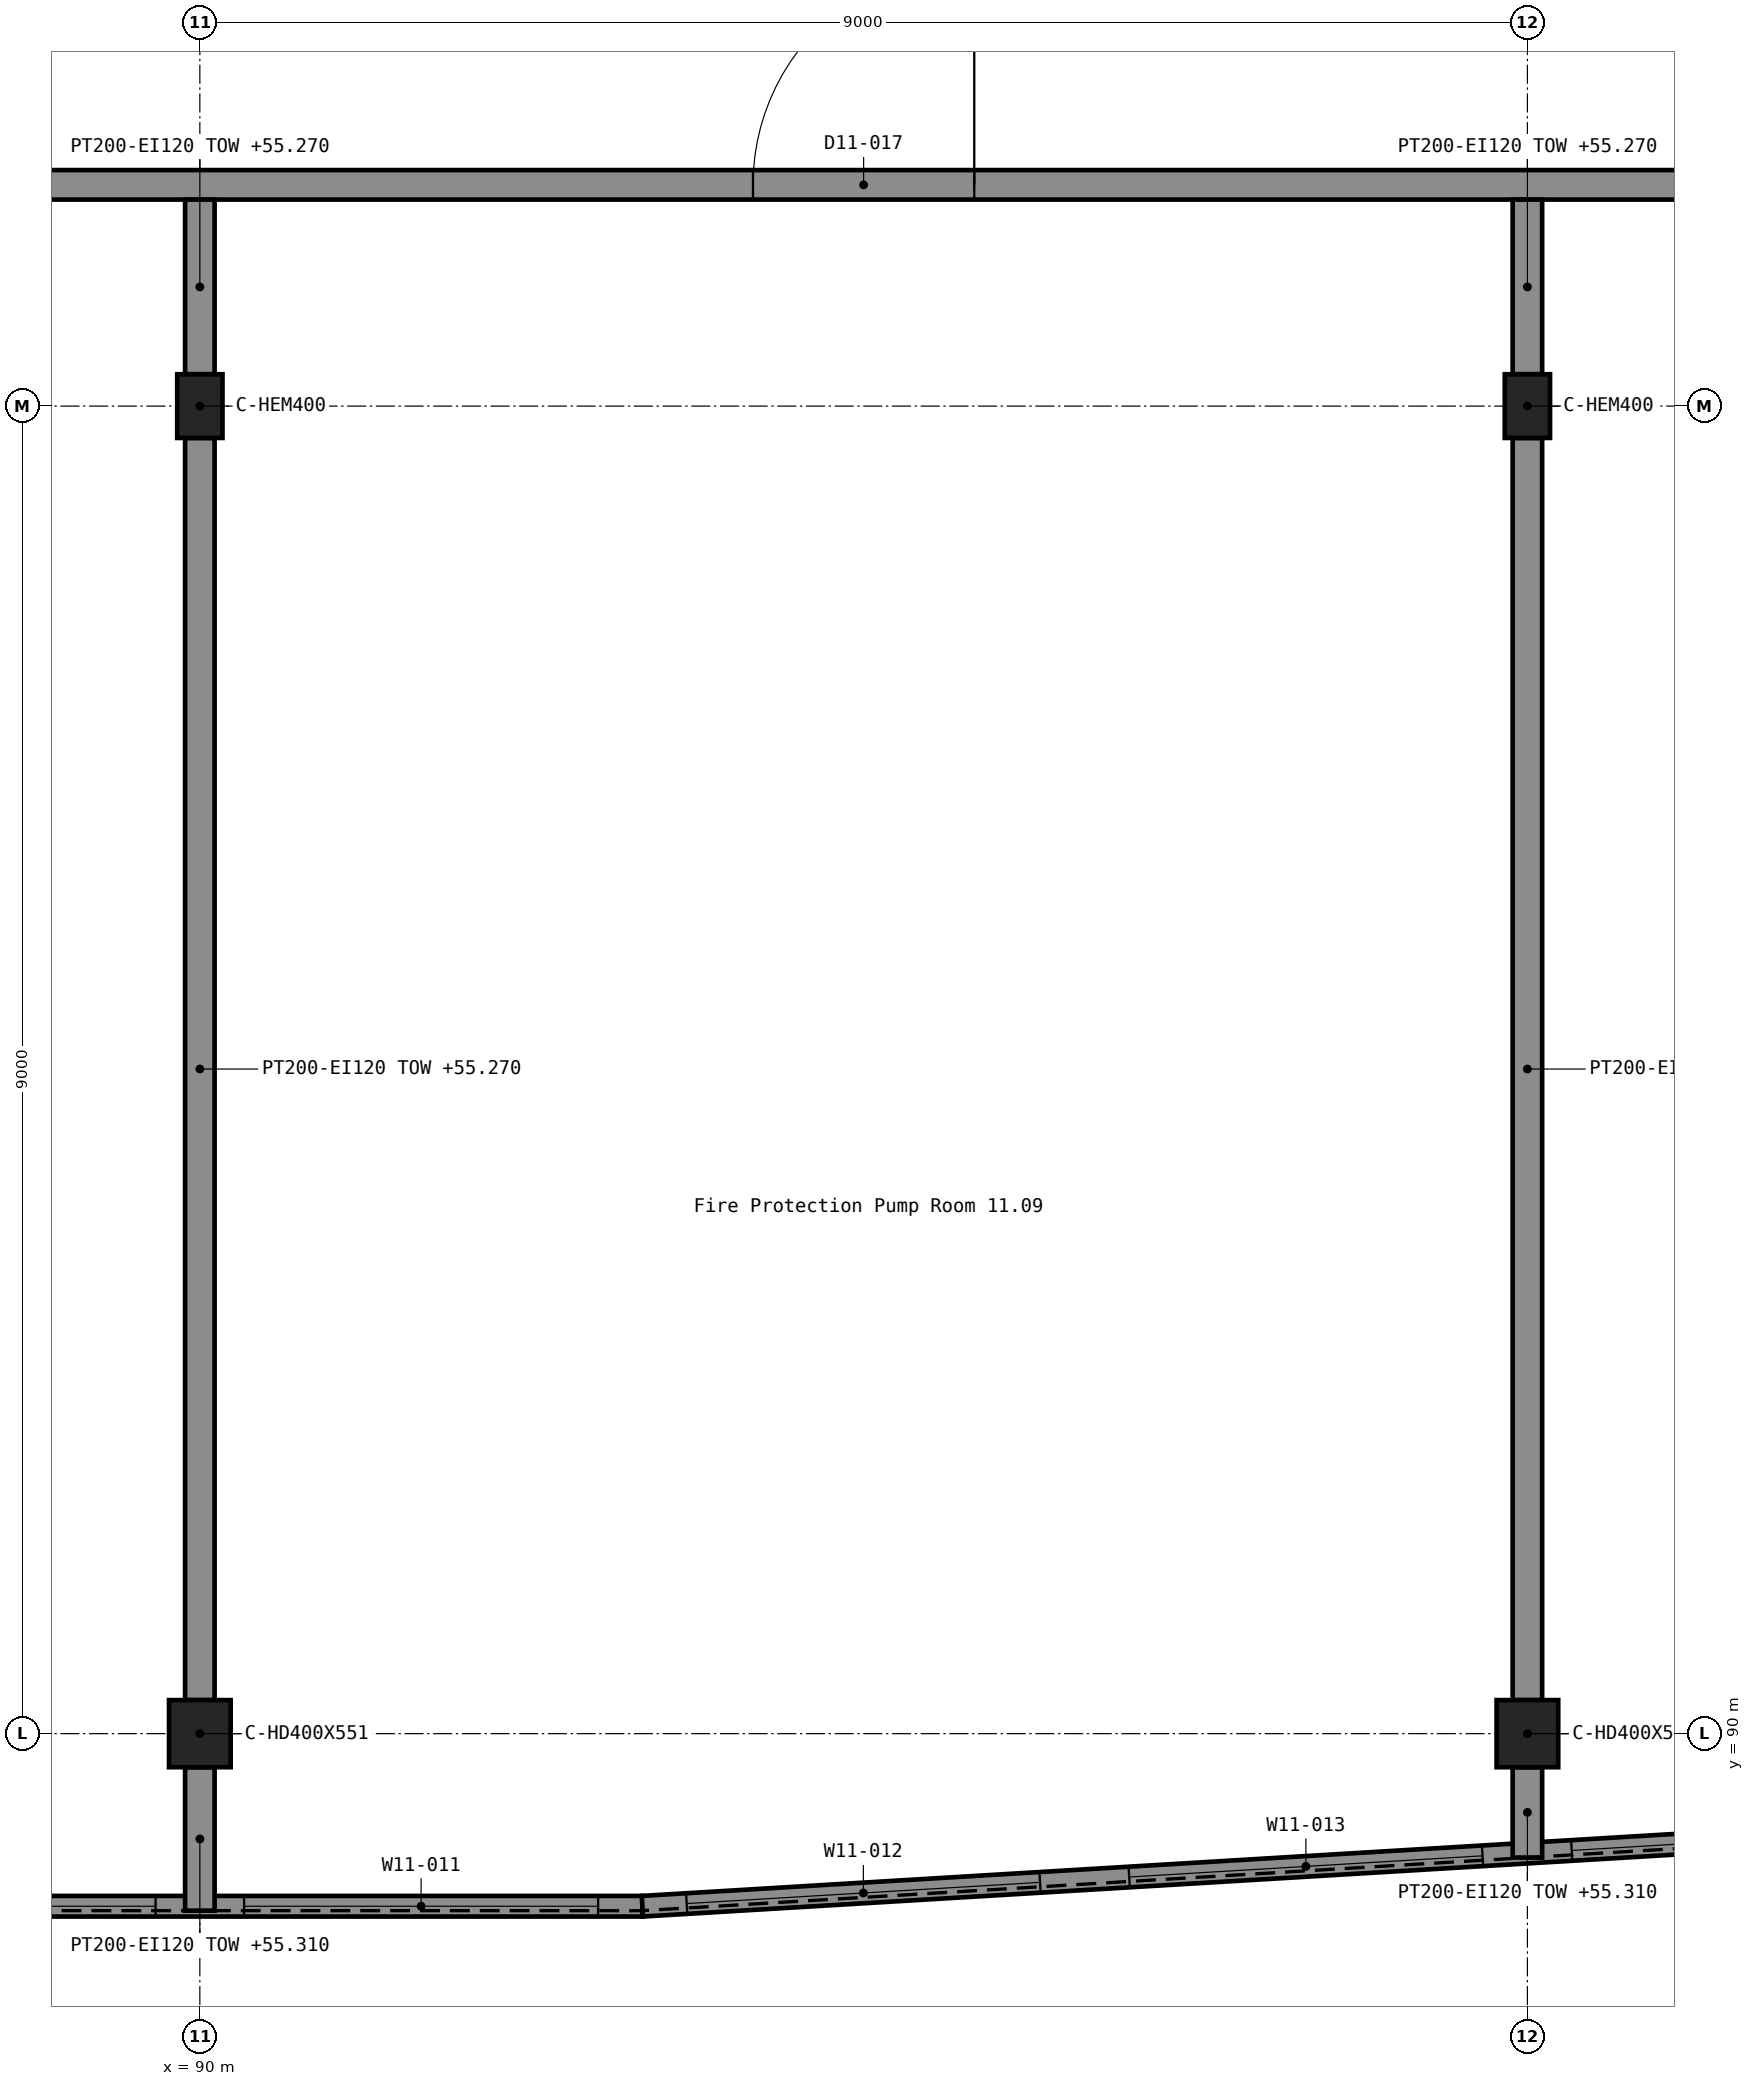
"""IFC4 building model, lengths in metres.
Left out: names, types, materials, properties, quantities, classifications, styles, units other than length and angle.
Written with IfcOpenShell. Run it as: python <this file> out.ifc"""

import sys

from ifc_helpers import new_model, si_unit, direction, frame, frame_2d, origin, origin_2d, place, context, subcontext, project, spatial, rectangle, i_section, extrude, element, fill, save


model = new_model("IFC4")
c1 = context("Model", 3, precision=1e-05, world=origin(), true_north=direction((0.0, 1.0)))
c2 = subcontext(c1, "Body", "Model", "MODEL_VIEW")
j1 = project(units=[si_unit("LENGTHUNIT", "METRE"), si_unit("PLANEANGLEUNIT", "RADIAN")], contexts=[c1])
p1 = place(None, origin())
s1 = spatial("IfcSite", under=j1, at=p1, CompositionType="ELEMENT")
p2 = place(p1, origin())
s2 = spatial("IfcBuilding", under=s1, at=p2, CompositionType="ELEMENT")
p3 = place(p2, frame((0.0, 0.0, 51.9)))
s3 = spatial("IfcBuildingStorey", under=s2, at=p3, CompositionType="ELEMENT", Elevation=51.9)
for number, where, z_axis, x_axis in (
    (1, (90.0, 90.0, 0.0), (0.0, 0.0, 1.0), (1.0, 0.0, 0.0)),
    (2, (99.0, 90.0, 0.0), (0.0, 0.0, 1.0), (1.0, 0.0, 0.0)),
):
    element("IfcColumn", number, at=place(p3, frame(where, z_axis=z_axis, x_axis=x_axis)), inside=s3, PredefinedType="COLUMN", context=c2, shape_type="SweptSolid", body=[
        extrude(i_section(OverallWidth=0.418, OverallDepth=0.455, WebThickness=0.042, FlangeThickness=0.068, FilletRadius=0.015, at=origin_2d()), origin(), (0.0, 0.0, 1.0), 3.9),
    ])
for number, where, z_axis, x_axis in (
    (3, (90.0, 99.0, 0.0), (0.0, 0.0, 1.0), (1.0, 0.0, 0.0)),
    (4, (99.0, 99.0, 0.0), (0.0, 0.0, 1.0), (1.0, 0.0, 0.0)),
):
    element("IfcColumn", number, at=place(p3, frame(where, z_axis=z_axis, x_axis=x_axis)), inside=s3, PredefinedType="COLUMN", context=c2, shape_type="SweptSolid", body=[
        extrude(i_section(OverallWidth=0.307, OverallDepth=0.432, WebThickness=0.021, FlangeThickness=0.04, FilletRadius=0.027, at=origin_2d()), origin(), (0.0, 0.0, 1.0), 3.9),
    ])
p4 = place(p3, frame((78.002, 88.83, 0.0), z_axis=(0.0, 0.0, 1.0), x_axis=(1.0, 0.0, 0.0)))
e5 = element("IfcWall", 5, at=p4, inside=s3, PredefinedType="SOLIDWALL", context=c2, shape_type="SweptSolid", body=[
    extrude(rectangle(XDim=14.998, YDim=0.14, at=frame_2d((7.499, 0.0))), origin(), (0.0, 0.0, 1.0), 3.9),
])
p5 = place(p4, frame((0.298, 0.0, 0.6)))
e6 = element("IfcOpeningElement", 6, at=p5, cuts=e5, PredefinedType="OPENING", context=c2, shape_type="SweptSolid", body=[
    extrude(rectangle(XDim=2.4, YDim=2.4, at=frame_2d((1.2, 1.2))), frame((0.0, 0.081, 0.0), z_axis=(0.0, -1.0, 0.0), x_axis=(1.0, 0.0, 0.0)), (0.0, 0.0, 1.0), 0.162),
])
p6 = place(p4, frame((3.298, 0.0, 0.6)))
e7 = element("IfcOpeningElement", 7, at=p6, cuts=e5, PredefinedType="OPENING", context=c2, shape_type="SweptSolid", body=[
    extrude(rectangle(XDim=2.4, YDim=2.4, at=frame_2d((1.2, 1.2))), frame((0.0, 0.081, 0.0), z_axis=(0.0, -1.0, 0.0), x_axis=(1.0, 0.0, 0.0)), (0.0, 0.0, 1.0), 0.162),
])
p7 = place(p4, frame((6.298, 0.0, 0.6)))
e8 = element("IfcOpeningElement", 8, at=p7, cuts=e5, PredefinedType="OPENING", context=c2, shape_type="SweptSolid", body=[
    extrude(rectangle(XDim=2.4, YDim=2.4, at=frame_2d((1.2, 1.2))), frame((0.0, 0.081, 0.0), z_axis=(0.0, -1.0, 0.0), x_axis=(1.0, 0.0, 0.0)), (0.0, 0.0, 1.0), 0.162),
])
p8 = place(p4, frame((9.298, 0.0, 0.6)))
e9 = element("IfcOpeningElement", 9, at=p8, cuts=e5, PredefinedType="OPENING", context=c2, shape_type="SweptSolid", body=[
    extrude(rectangle(XDim=2.4, YDim=2.4, at=frame_2d((1.2, 1.2))), frame((0.0, 0.081, 0.0), z_axis=(0.0, -1.0, 0.0), x_axis=(1.0, 0.0, 0.0)), (0.0, 0.0, 1.0), 0.162),
])
p9 = place(p4, frame((12.298, 0.0, 0.6)))
e10 = element("IfcOpeningElement", 10, at=p9, cuts=e5, PredefinedType="OPENING", context=c2, shape_type="SweptSolid", body=[
    extrude(rectangle(XDim=2.4, YDim=2.4, at=frame_2d((1.2, 1.2))), frame((0.0, 0.081, 0.0), z_axis=(0.0, -1.0, 0.0), x_axis=(1.0, 0.0, 0.0)), (0.0, 0.0, 1.0), 0.162),
])
p10 = place(p3, frame((93.0, 88.83, 0.0), z_axis=(0.0, 0.0, 1.0), x_axis=(0.998204826037, 0.059892614536, 0.0)))
e11 = element("IfcWall", 11, at=p10, inside=s3, PredefinedType="SOLIDWALL", context=c2, shape_type="SweptSolid", body=[
    extrude(rectangle(XDim=15.025, YDim=0.14, at=frame_2d((7.513, 0.0))), origin(), (0.0, 0.0, 1.0), 3.9),
])
p11 = place(p10, frame((0.301, 0.0, 0.6)))
e12 = element("IfcOpeningElement", 12, at=p11, cuts=e11, PredefinedType="OPENING", context=c2, shape_type="SweptSolid", body=[
    extrude(rectangle(XDim=2.4, YDim=2.4, at=frame_2d((1.2, 1.2))), frame((0.0, 0.081, 0.0), z_axis=(0.0, -1.0, 0.0), x_axis=(1.0, 0.0, 0.0)), (0.0, 0.0, 1.0), 0.162),
])
p12 = place(p10, frame((3.306, 0.0, 0.6)))
e13 = element("IfcOpeningElement", 13, at=p12, cuts=e11, PredefinedType="OPENING", context=c2, shape_type="SweptSolid", body=[
    extrude(rectangle(XDim=2.4, YDim=2.4, at=frame_2d((1.2, 1.2))), frame((0.0, 0.081, 0.0), z_axis=(0.0, -1.0, 0.0), x_axis=(1.0, 0.0, 0.0)), (0.0, 0.0, 1.0), 0.162),
])
p13 = place(p10, frame((6.312, 0.0, 0.6)))
e14 = element("IfcOpeningElement", 14, at=p13, cuts=e11, PredefinedType="OPENING", context=c2, shape_type="SweptSolid", body=[
    extrude(rectangle(XDim=2.4, YDim=2.4, at=frame_2d((1.2, 1.2))), frame((0.0, 0.081, 0.0), z_axis=(0.0, -1.0, 0.0), x_axis=(1.0, 0.0, 0.0)), (0.0, 0.0, 1.0), 0.162),
])
p14 = place(p10, frame((9.317, 0.0, 0.6)))
e15 = element("IfcOpeningElement", 15, at=p14, cuts=e11, PredefinedType="OPENING", context=c2, shape_type="SweptSolid", body=[
    extrude(rectangle(XDim=2.4, YDim=2.4, at=frame_2d((1.2, 1.2))), frame((0.0, 0.081, 0.0), z_axis=(0.0, -1.0, 0.0), x_axis=(1.0, 0.0, 0.0)), (0.0, 0.0, 1.0), 0.162),
])
p15 = place(p10, frame((12.323, 0.0, 0.6)))
e16 = element("IfcOpeningElement", 16, at=p15, cuts=e11, PredefinedType="OPENING", context=c2, shape_type="SweptSolid", body=[
    extrude(rectangle(XDim=2.4, YDim=2.4, at=frame_2d((1.2, 1.2))), frame((0.0, 0.081, 0.0), z_axis=(0.0, -1.0, 0.0), x_axis=(1.0, 0.0, 0.0)), (0.0, 0.0, 1.0), 0.162),
])
p16 = place(p3, frame((66.0, 100.5, 0.0), z_axis=(0.0, 0.0, 1.0), x_axis=(1.0, 0.0, 0.0)))
e17 = element("IfcWall", 17, at=p16, inside=s3, PredefinedType="PARTITIONING", context=c2, shape_type="SweptSolid", body=[
    extrude(rectangle(XDim=39.0, YDim=0.2, at=frame_2d((19.5, 0.0))), origin(), (0.0, 0.0, 1.0), 3.77),
])
p17 = place(p16, frame((2.25, 0.0, 0.0)))
e18 = element("IfcOpeningElement", 18, at=p17, cuts=e17, PredefinedType="OPENING", context=c2, shape_type="SweptSolid", body=[
    extrude(rectangle(XDim=1.5, YDim=2.4, at=frame_2d((0.75, 1.2))), frame((0.0, 0.111, 0.0), z_axis=(0.0, -1.0, 0.0), x_axis=(1.0, 0.0, 0.0)), (0.0, 0.0, 1.0), 0.222),
])
p18 = place(p16, frame((13.125, 0.0, 0.0)))
e19 = element("IfcOpeningElement", 19, at=p18, cuts=e17, PredefinedType="OPENING", context=c2, shape_type="SweptSolid", body=[
    extrude(rectangle(XDim=1.5, YDim=2.4, at=frame_2d((0.75, 1.2))), frame((0.0, 0.111, 0.0), z_axis=(0.0, -1.0, 0.0), x_axis=(1.0, 0.0, 0.0)), (0.0, 0.0, 1.0), 0.222),
])
p19 = place(p16, frame((27.75, 0.0, 0.0)))
e20 = element("IfcOpeningElement", 20, at=p19, cuts=e17, PredefinedType="OPENING", context=c2, shape_type="SweptSolid", body=[
    extrude(rectangle(XDim=1.5, YDim=2.4, at=frame_2d((0.75, 1.2))), frame((0.0, 0.111, 0.0), z_axis=(0.0, -1.0, 0.0), x_axis=(1.0, 0.0, 0.0)), (0.0, 0.0, 1.0), 0.222),
])
p20 = place(p16, frame((35.25, 0.0, 0.0)))
e21 = element("IfcOpeningElement", 21, at=p20, cuts=e17, PredefinedType="OPENING", context=c2, shape_type="SweptSolid", body=[
    extrude(rectangle(XDim=1.5, YDim=2.4, at=frame_2d((0.75, 1.2))), frame((0.0, 0.111, 0.0), z_axis=(0.0, -1.0, 0.0), x_axis=(1.0, 0.0, 0.0)), (0.0, 0.0, 1.0), 0.222),
])
p21 = place(p3, frame((90.0, 88.8, 0.0), z_axis=(0.0, 0.0, 1.0), x_axis=(0.0, 1.0, 0.0)))
e22 = element("IfcWall", 22, at=p21, inside=s3, PredefinedType="PARTITIONING", context=c2, shape_type="SweptSolid", body=[
    extrude(rectangle(XDim=0.972, YDim=0.2, at=frame_2d((0.486, 0.0))), origin(), (0.0, 0.0, 1.0), 3.41),
])
p22 = place(p3, frame((90.0, 90.228, 0.0), z_axis=(0.0, 0.0, 1.0), x_axis=(0.0, 1.0, 0.0)))
e23 = element("IfcWall", 23, at=p22, inside=s3, PredefinedType="PARTITIONING", context=c2, shape_type="SweptSolid", body=[
    extrude(rectangle(XDim=8.556, YDim=0.2, at=frame_2d((4.278, 0.0))), origin(), (0.0, 0.0, 1.0), 3.37),
])
p23 = place(p3, frame((90.0, 99.216, 0.0), z_axis=(0.0, 0.0, 1.0), x_axis=(0.0, 1.0, 0.0)))
e24 = element("IfcWall", 24, at=p23, inside=s3, PredefinedType="PARTITIONING", context=c2, shape_type="SweptSolid", body=[
    extrude(rectangle(XDim=1.184, YDim=0.2, at=frame_2d((0.592, 0.0))), origin(), (0.0, 0.0, 1.0), 3.37),
])
p24 = place(p3, frame((99.0, 89.16, 0.0), z_axis=(0.0, 0.0, 1.0), x_axis=(0.0, 1.0, 0.0)))
e25 = element("IfcWall", 25, at=p24, inside=s3, PredefinedType="PARTITIONING", context=c2, shape_type="SweptSolid", body=[
    extrude(rectangle(XDim=0.613, YDim=0.2, at=frame_2d((0.306, 0.0))), origin(), (0.0, 0.0, 1.0), 3.41),
])
p25 = place(p3, frame((99.0, 90.228, 0.0), z_axis=(0.0, 0.0, 1.0), x_axis=(0.0, 1.0, 0.0)))
e26 = element("IfcWall", 26, at=p25, inside=s3, PredefinedType="PARTITIONING", context=c2, shape_type="SweptSolid", body=[
    extrude(rectangle(XDim=8.556, YDim=0.2, at=frame_2d((4.278, 0.0))), origin(), (0.0, 0.0, 1.0), 3.37),
])
p26 = place(p3, frame((99.0, 99.216, 0.0), z_axis=(0.0, 0.0, 1.0), x_axis=(0.0, 1.0, 0.0)))
e27 = element("IfcWall", 27, at=p26, inside=s3, PredefinedType="PARTITIONING", context=c2, shape_type="SweptSolid", body=[
    extrude(rectangle(XDim=1.184, YDim=0.2, at=frame_2d((0.592, 0.0))), origin(), (0.0, 0.0, 1.0), 3.37),
])
p27 = place(p8, origin())
e28 = element("IfcWindow", 28, at=p27, inside=s3, PartitioningType="SINGLE_PANEL", PredefinedType="WINDOW", context=c2, shape_type="SweptSolid", body=[
    extrude(rectangle(XDim=2.4, YDim=2.4, at=frame_2d((1.2, 1.2))), frame((0.0, 0.03, 0.0), z_axis=(0.0, -1.0, 0.0), x_axis=(1.0, 0.0, 0.0)), (0.0, 0.0, 1.0), 0.06),
])
fill(e9, e28)
p28 = place(p9, origin())
e29 = element("IfcWindow", 29, at=p28, inside=s3, PartitioningType="SINGLE_PANEL", PredefinedType="WINDOW", context=c2, shape_type="SweptSolid", body=[
    extrude(rectangle(XDim=2.4, YDim=2.4, at=frame_2d((1.2, 1.2))), frame((0.0, 0.03, 0.0), z_axis=(0.0, -1.0, 0.0), x_axis=(1.0, 0.0, 0.0)), (0.0, 0.0, 1.0), 0.06),
])
fill(e10, e29)
p29 = place(p11, origin())
e30 = element("IfcWindow", 30, at=p29, inside=s3, PartitioningType="SINGLE_PANEL", PredefinedType="WINDOW", context=c2, shape_type="SweptSolid", body=[
    extrude(rectangle(XDim=2.4, YDim=2.4, at=frame_2d((1.2, 1.2))), frame((0.0, 0.03, 0.0), z_axis=(0.0, -1.0, 0.0), x_axis=(1.0, 0.0, 0.0)), (0.0, 0.0, 1.0), 0.06),
])
fill(e12, e30)
p30 = place(p12, origin())
e31 = element("IfcWindow", 31, at=p30, inside=s3, PartitioningType="SINGLE_PANEL", PredefinedType="WINDOW", context=c2, shape_type="SweptSolid", body=[
    extrude(rectangle(XDim=2.4, YDim=2.4, at=frame_2d((1.2, 1.2))), frame((0.0, 0.03, 0.0), z_axis=(0.0, -1.0, 0.0), x_axis=(1.0, 0.0, 0.0)), (0.0, 0.0, 1.0), 0.06),
])
fill(e13, e31)
p31 = place(p13, origin())
e32 = element("IfcWindow", 32, at=p31, inside=s3, PartitioningType="SINGLE_PANEL", PredefinedType="WINDOW", context=c2, shape_type="SweptSolid", body=[
    extrude(rectangle(XDim=2.4, YDim=2.4, at=frame_2d((1.2, 1.2))), frame((0.0, 0.03, 0.0), z_axis=(0.0, -1.0, 0.0), x_axis=(1.0, 0.0, 0.0)), (0.0, 0.0, 1.0), 0.06),
])
fill(e14, e32)
p32 = place(p19, origin())
e33 = element("IfcDoor", 33, at=p32, inside=s3, OperationType="DOUBLE_DOOR_SINGLE_SWING", PredefinedType="DOOR", context=c2, shape_type="SweptSolid", body=[
    extrude(rectangle(XDim=1.5, YDim=2.4, at=frame_2d((0.75, 1.2))), frame((0.0, 0.025, 0.0), z_axis=(0.0, -1.0, 0.0), x_axis=(1.0, 0.0, 0.0)), (0.0, 0.0, 1.0), 0.05),
])
fill(e20, e33)
save(model, sys.argv[1])
